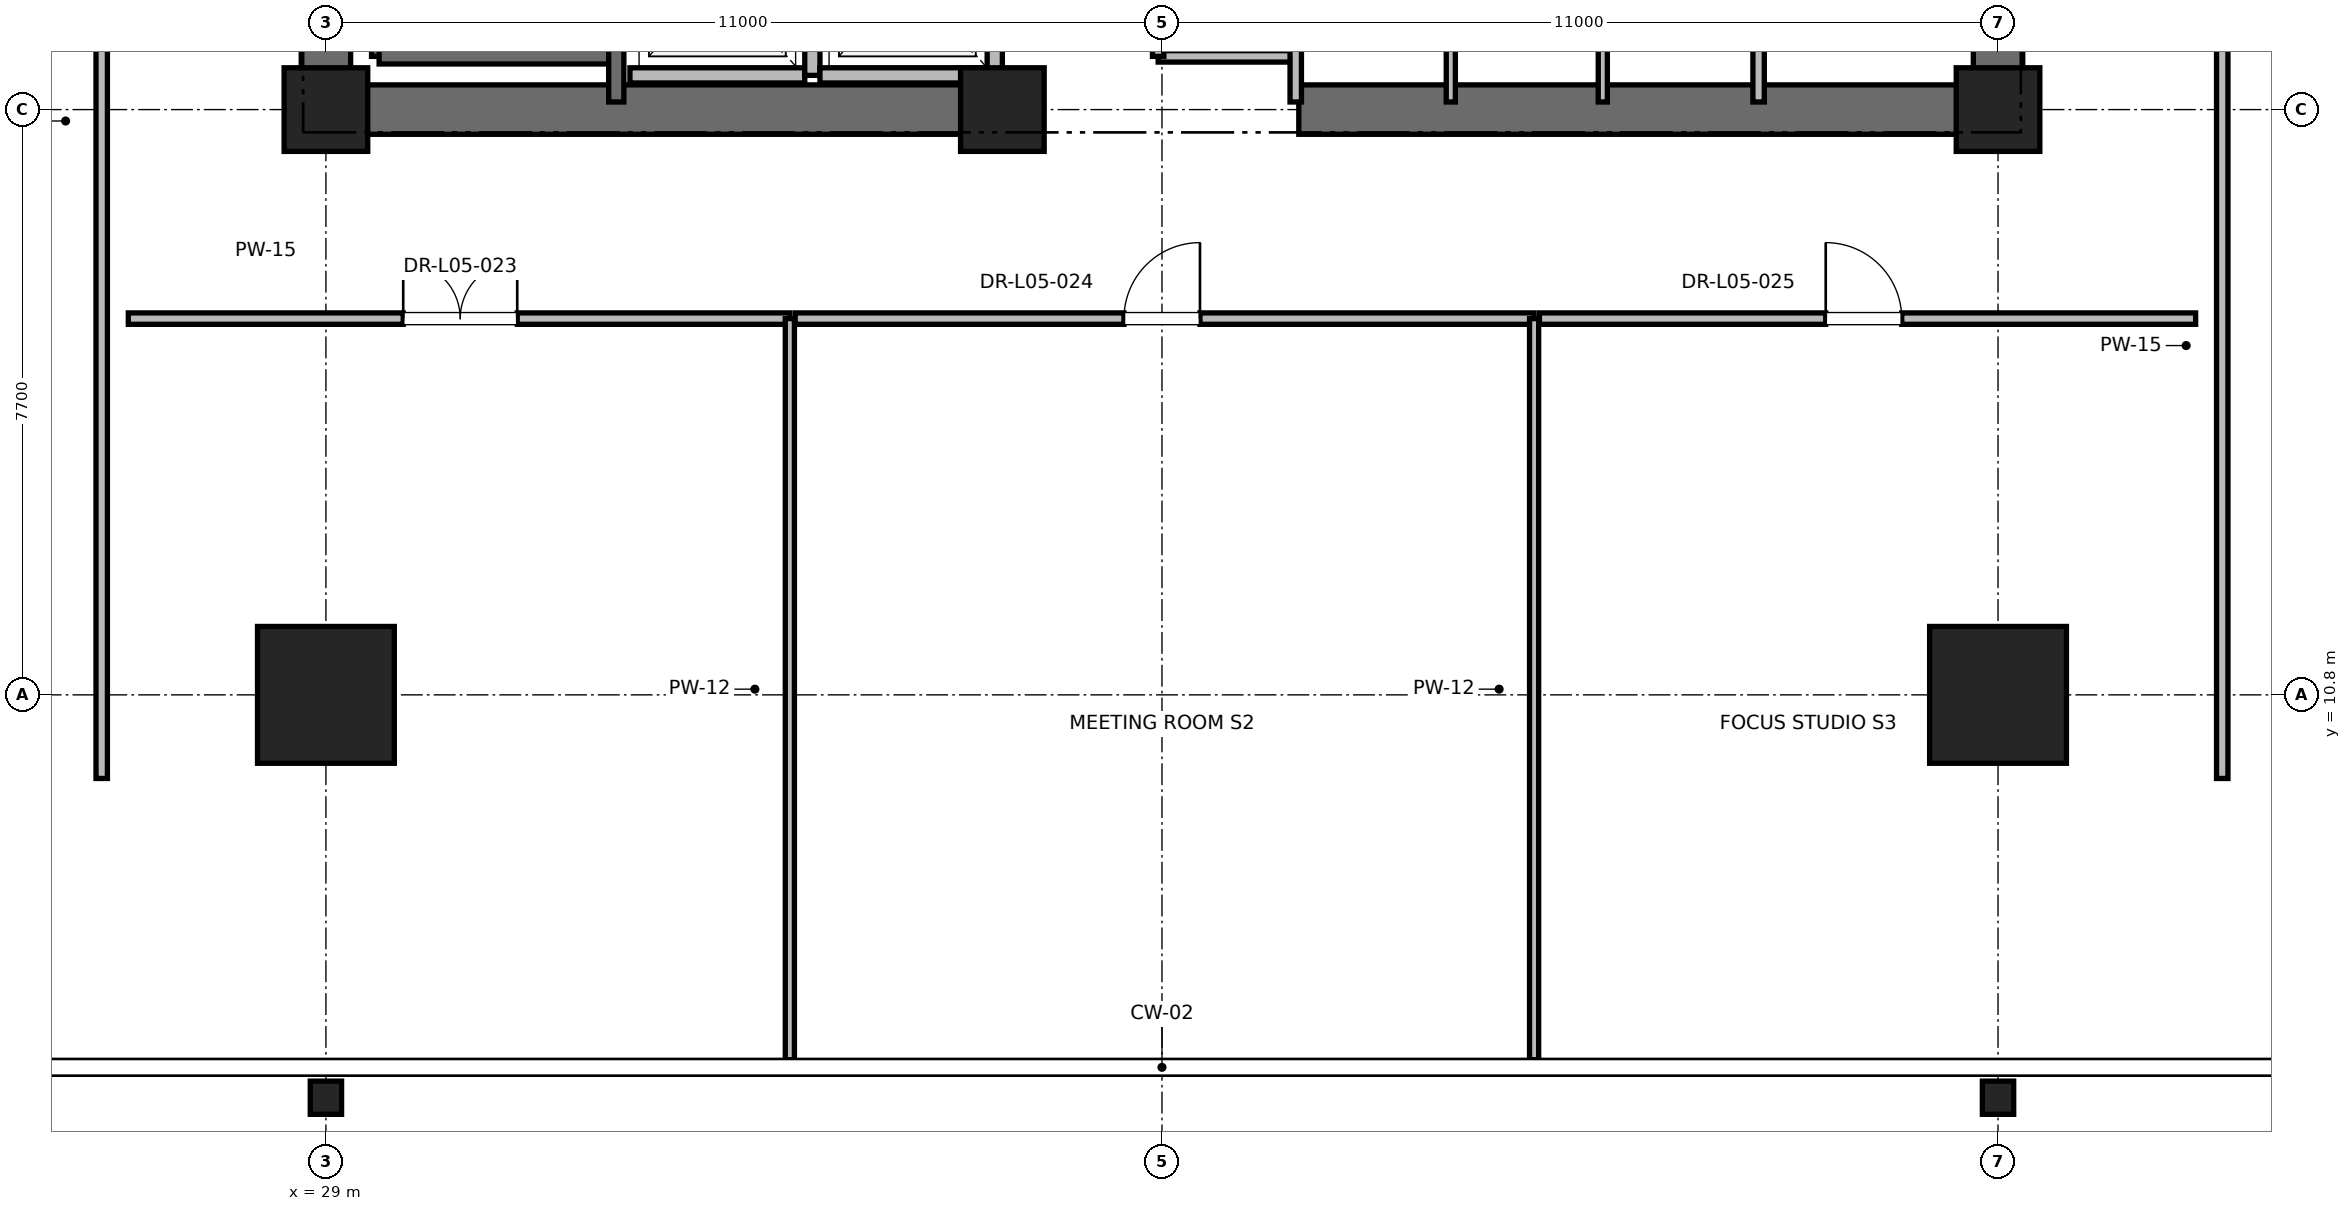
"""IFC4 building model, lengths in metres.
Left out: names, types, materials, properties, quantities, classifications, styles, units other than length and angle.
Written with IfcOpenShell. Run it as: python <this file> out.ifc"""

import sys

from ifc_helpers import new_model, si_unit, direction, frame, frame_2d, origin, origin_2d, place, context, subcontext, project, spatial, rectangle, i_section, extrude, element, fill, save


model = new_model("IFC4")
c1 = context("Model", 3, precision=1e-05, world=origin(), true_north=direction((0.0, 1.0)))
c2 = subcontext(c1, "Body", "Model", "MODEL_VIEW")
j1 = project(units=[si_unit("LENGTHUNIT", "METRE"), si_unit("PLANEANGLEUNIT", "RADIAN")], contexts=[c1])
p1 = place(None, origin())
s1 = spatial("IfcSite", under=j1, at=p1, CompositionType="ELEMENT")
p2 = place(p1, origin())
s2 = spatial("IfcBuilding", under=s1, at=p2, CompositionType="ELEMENT")
p3 = place(p2, frame((0.0, 0.0, 27.6)))
s3 = spatial("IfcBuildingStorey", under=s2, at=p3, CompositionType="ELEMENT", Elevation=27.6)
for number, where, z_axis, x_axis in (
    (1, (29.0, 10.8, 0.0), (0.0, 0.0, 1.0), (1.0, 0.0, 0.0)),
    (2, (51.0, 10.8, 0.0), (0.0, 0.0, 1.0), (1.0, 0.0, 0.0)),
):
    element("IfcColumn", number, at=place(p3, frame(where, z_axis=z_axis, x_axis=x_axis)), inside=s3, PredefinedType="COLUMN", context=c2, shape_type="SweptSolid", body=[
        extrude(rectangle(XDim=1.8, YDim=1.8, at=origin_2d()), origin(), (0.0, 0.0, 1.0), 4.0),
    ])
for number, where, z_axis, x_axis in (
    (3, (29.0, 5.5, 0.0), (0.0, 0.0, 1.0), (1.0, 0.0, 0.0)),
    (4, (51.0, 5.5, 0.0), (0.0, 0.0, 1.0), (1.0, 0.0, 0.0)),
):
    element("IfcColumn", number, at=place(p3, frame(where, z_axis=z_axis, x_axis=x_axis)), inside=s3, PredefinedType="COLUMN", context=c2, shape_type="SweptSolid", body=[
        extrude(i_section(OverallWidth=0.412, OverallDepth=0.437, WebThickness=0.036, FlangeThickness=0.058, FilletRadius=0.015, at=origin_2d()), origin(), (0.0, 0.0, 1.0), 4.0),
    ])
for number, where, z_axis, x_axis in (
    (5, (29.0, 18.5, 0.0), (0.0, 0.0, 1.0), (1.0, 0.0, 0.0)),
    (6, (51.0, 18.5, 0.0), (0.0, 0.0, 1.0), (1.0, 0.0, 0.0)),
    (7, (37.9, 18.5, 0.0), (0.0, 0.0, 1.0), (1.0, 0.0, 0.0)),
):
    element("IfcColumn", number, at=place(p3, frame(where, z_axis=z_axis, x_axis=x_axis)), inside=s3, PredefinedType="PILASTER", context=c2, shape_type="SweptSolid", body=[
        extrude(rectangle(XDim=1.1, YDim=1.1, at=origin_2d()), origin(), (0.0, 0.0, 1.0), 4.0),
    ])
for number, where, z_axis, x_axis in (
    (8, (29.0, 18.5, 0.0), (0.0, 0.0, 1.0), (1.0, 0.0, 0.0)),
    (9, (41.8, 18.5, 0.0), (0.0, 0.0, 1.0), (1.0, 0.0, 0.0)),
):
    element("IfcWall", number, at=place(p3, frame(where, z_axis=z_axis, x_axis=x_axis)), inside=s3, PredefinedType="SHEAR", context=c2, shape_type="SweptSolid", body=[
        extrude(rectangle(XDim=9.2, YDim=0.65, at=frame_2d((4.6, 0.0))), origin(), (0.0, 0.0, 1.0), 3.76),
    ])
p4 = place(p3, frame((29.0, 18.5, 0.0), z_axis=(0.0, 0.0, 1.0), x_axis=(0.0, 1.0, 0.0)))
e10 = element("IfcWall", 10, at=p4, inside=s3, PredefinedType="SHEAR", context=c2, shape_type="SweptSolid", body=[
    extrude(rectangle(XDim=8.8, YDim=0.65, at=frame_2d((4.4, 0.0))), origin(), (0.0, 0.0, 1.0), 3.76),
])
p5 = place(p3, frame((51.0, 18.5, 0.0), z_axis=(0.0, 0.0, 1.0), x_axis=(0.0, 1.0, 0.0)))
e11 = element("IfcWall", 11, at=p5, inside=s3, PredefinedType="SHEAR", context=c2, shape_type="SweptSolid", body=[
    extrude(rectangle(XDim=5.8, YDim=0.65, at=frame_2d((2.9, 0.0))), origin(), (0.0, 0.0, 1.0), 3.76),
])
p6 = place(p3, frame((29.7, 19.2, 0.0), z_axis=(0.0, 0.0, 1.0), x_axis=(0.0, 1.0, 0.0)))
e12 = element("IfcWall", 12, at=p6, inside=s3, PredefinedType="SOLIDWALL", context=c2, shape_type="SweptSolid", body=[
    extrude(rectangle(XDim=8.15, YDim=0.2, at=frame_2d((4.075, 0.0))), origin(), (0.0, 0.0, 1.0), 3.76),
])
p7 = place(p3, frame((29.7, 19.2, 0.0), z_axis=(0.0, 0.0, 1.0), x_axis=(1.0, 0.0, 0.0)))
e13 = element("IfcWall", 13, at=p7, inside=s3, PredefinedType="SOLIDWALL", context=c2, shape_type="SweptSolid", body=[
    extrude(rectangle(XDim=3.12, YDim=0.2, at=frame_2d((1.56, 0.0))), origin(), (0.0, 0.0, 1.0), 3.76),
])
p8 = place(p3, frame((32.82, 18.6, 0.0), z_axis=(0.0, 0.0, 1.0), x_axis=(0.0, 1.0, 0.0)))
e14 = element("IfcWall", 14, at=p8, inside=s3, PredefinedType="SOLIDWALL", context=c2, shape_type="SweptSolid", body=[
    extrude(rectangle(XDim=8.78, YDim=0.2, at=frame_2d((4.39, 0.0))), origin(), (0.0, 0.0, 1.0), 3.76),
])
p9 = place(p3, frame((33.0, 18.95, 0.0), z_axis=(0.0, 0.0, 1.0), x_axis=(1.0, 0.0, 0.0)))
e15 = element("IfcWall", 15, at=p9, inside=s3, PredefinedType="SOLIDWALL", context=c2, shape_type="SweptSolid", body=[
    extrude(rectangle(XDim=2.3, YDim=0.2, at=frame_2d((1.15, 0.0))), origin(), (0.0, 0.0, 1.0), 3.76),
])
p10 = place(p3, frame((35.4, 18.95, 0.0), z_axis=(0.0, 0.0, 1.0), x_axis=(0.0, 1.0, 0.0)))
e16 = element("IfcWall", 16, at=p10, inside=s3, PredefinedType="SOLIDWALL", context=c2, shape_type="SweptSolid", body=[
    extrude(rectangle(XDim=2.6, YDim=0.2, at=frame_2d((1.3, 0.0))), origin(), (0.0, 0.0, 1.0), 3.76),
])
p11 = place(p3, frame((35.5, 18.95, 0.0), z_axis=(0.0, 0.0, 1.0), x_axis=(1.0, 0.0, 0.0)))
e17 = element("IfcWall", 17, at=p11, inside=s3, PredefinedType="SOLIDWALL", context=c2, shape_type="SweptSolid", body=[
    extrude(rectangle(XDim=2.3, YDim=0.2, at=frame_2d((1.15, 0.0))), origin(), (0.0, 0.0, 1.0), 2.54),
])
p12 = place(p3, frame((37.8, 18.95, 0.0), z_axis=(0.0, 0.0, 1.0), x_axis=(0.0, 1.0, 0.0)))
e18 = element("IfcWall", 18, at=p12, inside=s3, PredefinedType="SOLIDWALL", context=c2, shape_type="SweptSolid", body=[
    extrude(rectangle(XDim=2.6, YDim=0.2, at=frame_2d((1.3, 0.0))), origin(), (0.0, 0.0, 1.0), 2.54),
])
p13 = place(p3, frame((39.95, 19.2, 0.0), z_axis=(0.0, 0.0, 1.0), x_axis=(1.0, 0.0, 0.0)))
e19 = element("IfcWall", 19, at=p13, inside=s3, PredefinedType="PARTITIONING", context=c2, shape_type="SweptSolid", body=[
    extrude(rectangle(XDim=1.81, YDim=0.15, at=frame_2d((0.905, 0.0))), origin(), (0.0, 0.0, 1.0), 2.85),
])
p14 = place(p3, frame((41.76, 18.6, 0.0), z_axis=(0.0, 0.0, 1.0), x_axis=(0.0, 1.0, 0.0)))
e20 = element("IfcWall", 20, at=p14, inside=s3, PredefinedType="PARTITIONING", context=c2, shape_type="SweptSolid", body=[
    extrude(rectangle(XDim=3.6, YDim=0.15, at=frame_2d((1.8, 0.0))), origin(), (0.0, 0.0, 1.0), 2.54),
])
p15 = place(p3, frame((39.95, 19.2, 0.0), z_axis=(0.0, 0.0, 1.0), x_axis=(0.0, 1.0, 0.0)))
e21 = element("IfcWall", 21, at=p15, inside=s3, PredefinedType="PARTITIONING", context=c2, shape_type="SweptSolid", body=[
    extrude(rectangle(XDim=3.0, YDim=0.15, at=frame_2d((1.5, 0.0))), origin(), (0.0, 0.0, 1.0), 2.85),
])
p16 = place(p15, frame((1.05, 0.0, 0.0)))
e22 = element("IfcOpeningElement", 22, at=p16, cuts=e21, PredefinedType="OPENING", context=c2, shape_type="SweptSolid", body=[
    extrude(rectangle(XDim=0.9, YDim=2.1, at=frame_2d((0.45, 1.05))), frame((0.0, 0.075, 0.0), z_axis=(0.0, -1.0, 0.0), x_axis=(1.0, 0.0, 0.0)), (0.0, 0.0, 1.0), 0.15),
])
p17 = place(p3, frame((47.85, 18.6, 0.0), z_axis=(0.0, 0.0, 1.0), x_axis=(0.0, 1.0, 0.0)))
e23 = element("IfcWall", 23, at=p17, inside=s3, PredefinedType="PARTITIONING", context=c2, shape_type="SweptSolid", body=[
    extrude(rectangle(XDim=2.54, YDim=0.15, at=frame_2d((1.27, 0.0))), origin(), (0.0, 0.0, 1.0), 2.85),
])
for number, where, z_axis, x_axis in (
    (24, (43.8, 18.6, 0.0), (0.0, 0.0, 1.0), (0.0, 1.0, 0.0)),
    (25, (45.8, 18.6, 0.0), (0.0, 0.0, 1.0), (0.0, 1.0, 0.0)),
):
    element("IfcWall", number, at=place(p3, frame(where, z_axis=z_axis, x_axis=x_axis)), inside=s3, PredefinedType="PARTITIONING", context=c2, shape_type="SweptSolid", body=[
        extrude(rectangle(XDim=3.02, YDim=0.12, at=frame_2d((1.51, 0.0))), origin(), (0.0, 0.0, 1.0), 2.85),
    ])
p18 = place(p3, frame((26.4, 15.75, 0.0), z_axis=(0.0, 0.0, 1.0), x_axis=(1.0, 0.0, 0.0)))
e26 = element("IfcWall", 26, at=p18, inside=s3, PredefinedType="PARTITIONING", context=c2, shape_type="SweptSolid", body=[
    extrude(rectangle(XDim=8.704, YDim=0.15, at=frame_2d((4.352, 0.0))), origin(), (0.0, 0.0, 1.0), 2.85),
])
p19 = place(p18, frame((3.617, 0.0, 0.0)))
e27 = element("IfcOpeningElement", 27, at=p19, cuts=e26, PredefinedType="OPENING", context=c2, shape_type="SweptSolid", body=[
    extrude(rectangle(XDim=1.5, YDim=2.25, at=frame_2d((0.75, 1.125))), frame((0.0, 0.075, 0.0), z_axis=(0.0, -1.0, 0.0), x_axis=(1.0, 0.0, 0.0)), (0.0, 0.0, 1.0), 0.15),
])
p20 = place(p3, frame((35.104, 6.0, 0.0), z_axis=(0.0, 0.0, 1.0), x_axis=(0.0, 1.0, 0.0)))
e28 = element("IfcWall", 28, at=p20, inside=s3, PredefinedType="PARTITIONING", context=c2, shape_type="SweptSolid", body=[
    extrude(rectangle(XDim=9.75, YDim=0.12, at=frame_2d((4.875, 0.0))), origin(), (0.0, 0.0, 1.0), 2.39),
])
p21 = place(p3, frame((35.174, 15.75, 0.0), z_axis=(0.0, 0.0, 1.0), x_axis=(1.0, 0.0, 0.0)))
e29 = element("IfcWall", 29, at=p21, inside=s3, PredefinedType="PARTITIONING", context=c2, shape_type="SweptSolid", body=[
    extrude(rectangle(XDim=9.722, YDim=0.15, at=frame_2d((4.861, 0.0))), origin(), (0.0, 0.0, 1.0), 2.85),
])
p22 = place(p21, frame((4.326, 0.0, 0.0)))
e30 = element("IfcOpeningElement", 30, at=p22, cuts=e29, PredefinedType="OPENING", context=c2, shape_type="SweptSolid", body=[
    extrude(rectangle(XDim=1.0, YDim=2.15, at=frame_2d((0.5, 1.075))), frame((0.0, 0.075, 0.0), z_axis=(0.0, -1.0, 0.0), x_axis=(1.0, 0.0, 0.0)), (0.0, 0.0, 1.0), 0.15),
])
p23 = place(p3, frame((44.896, 6.0, 0.0), z_axis=(0.0, 0.0, 1.0), x_axis=(0.0, 1.0, 0.0)))
e31 = element("IfcWall", 31, at=p23, inside=s3, PredefinedType="PARTITIONING", context=c2, shape_type="SweptSolid", body=[
    extrude(rectangle(XDim=9.75, YDim=0.12, at=frame_2d((4.875, 0.0))), origin(), (0.0, 0.0, 1.0), 2.39),
])
p24 = place(p3, frame((44.966, 15.75, 0.0), z_axis=(0.0, 0.0, 1.0), x_axis=(1.0, 0.0, 0.0)))
e32 = element("IfcWall", 32, at=p24, inside=s3, PredefinedType="PARTITIONING", context=c2, shape_type="SweptSolid", body=[
    extrude(rectangle(XDim=8.634, YDim=0.15, at=frame_2d((4.317, 0.0))), origin(), (0.0, 0.0, 1.0), 2.85),
])
p25 = place(p24, frame((3.767, 0.0, 0.0)))
e33 = element("IfcOpeningElement", 33, at=p25, cuts=e32, PredefinedType="OPENING", context=c2, shape_type="SweptSolid", body=[
    extrude(rectangle(XDim=1.0, YDim=2.15, at=frame_2d((0.5, 1.075))), frame((0.0, 0.075, 0.0), z_axis=(0.0, -1.0, 0.0), x_axis=(1.0, 0.0, 0.0)), (0.0, 0.0, 1.0), 0.15),
])
p26 = place(p3, frame((26.05, 9.7, 0.0), z_axis=(0.0, 0.0, 1.0), x_axis=(0.0, 1.0, 0.0)))
e34 = element("IfcWall", 34, at=p26, inside=s3, PredefinedType="PARTITIONING", context=c2, shape_type="SweptSolid", body=[
    extrude(rectangle(XDim=35.6, YDim=0.15, at=frame_2d((17.8, 0.0))), origin(), (0.0, 0.0, 1.0), 2.85),
])
p27 = place(p26, frame((17.3, 0.0, 0.0)))
e35 = element("IfcOpeningElement", 35, at=p27, cuts=e34, PredefinedType="OPENING", context=c2, shape_type="SweptSolid", body=[
    extrude(rectangle(XDim=1.0, YDim=2.15, at=frame_2d((0.5, 1.075))), frame((0.0, 0.075, 0.0), z_axis=(0.0, -1.0, 0.0), x_axis=(1.0, 0.0, 0.0)), (0.0, 0.0, 1.0), 0.15),
])
p28 = place(p3, frame((53.95, 9.7, 0.0), z_axis=(0.0, 0.0, 1.0), x_axis=(0.0, 1.0, 0.0)))
e36 = element("IfcWall", 36, at=p28, inside=s3, PredefinedType="PARTITIONING", context=c2, shape_type="SweptSolid", body=[
    extrude(rectangle(XDim=14.952, YDim=0.15, at=frame_2d((7.476, 0.0))), origin(), (0.0, 0.0, 1.0), 2.85),
])
p29 = place(p28, frame((11.391, 0.0, 0.0)))
e37 = element("IfcOpeningElement", 37, at=p29, cuts=e36, PredefinedType="OPENING", context=c2, shape_type="SweptSolid", body=[
    extrude(rectangle(XDim=1.0, YDim=2.15, at=frame_2d((0.5, 1.075))), frame((0.0, 0.075, 0.0), z_axis=(0.0, -1.0, 0.0), x_axis=(1.0, 0.0, 0.0)), (0.0, 0.0, 1.0), 0.15),
])
p30 = place(p19, origin())
e38 = element("IfcDoor", 38, at=p30, inside=s3, OperationType="DOUBLE_DOOR_SINGLE_SWING", PredefinedType="DOOR", context=c2, shape_type="SweptSolid", body=[
    extrude(rectangle(XDim=1.5, YDim=2.25, at=frame_2d((0.75, 1.125))), frame((0.0, 0.025, 0.0), z_axis=(0.0, -1.0, 0.0), x_axis=(1.0, 0.0, 0.0)), (0.0, 0.0, 1.0), 0.05),
])
fill(e27, e38)
p31 = place(p22, origin())
e39 = element("IfcDoor", 39, at=p31, inside=s3, OperationType="SINGLE_SWING_RIGHT", PredefinedType="DOOR", context=c2, shape_type="SweptSolid", body=[
    extrude(rectangle(XDim=1.0, YDim=2.15, at=frame_2d((0.5, 1.075))), frame((0.0, 0.025, 0.0), z_axis=(0.0, -1.0, 0.0), x_axis=(1.0, 0.0, 0.0)), (0.0, 0.0, 1.0), 0.05),
])
fill(e30, e39)
p32 = place(p25, origin())
e40 = element("IfcDoor", 40, at=p32, inside=s3, OperationType="SINGLE_SWING_LEFT", PredefinedType="DOOR", context=c2, shape_type="SweptSolid", body=[
    extrude(rectangle(XDim=1.0, YDim=2.15, at=frame_2d((0.5, 1.075))), frame((0.0, 0.025, 0.0), z_axis=(0.0, -1.0, 0.0), x_axis=(1.0, 0.0, 0.0)), (0.0, 0.0, 1.0), 0.05),
])
fill(e33, e40)
save(model, sys.argv[1])
